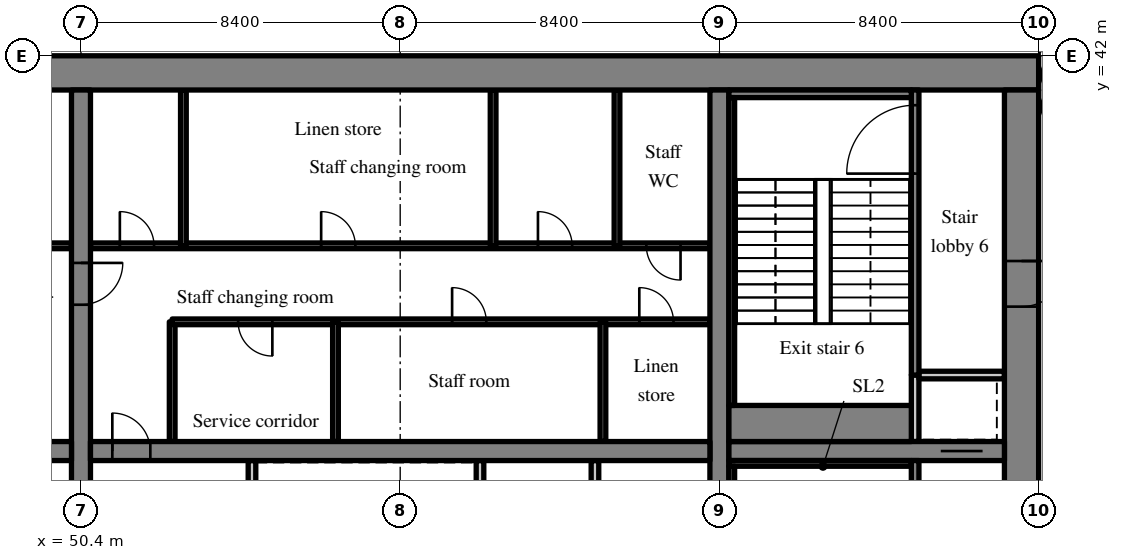
"""IFC4 building model, lengths in metres.
Left out: names, types, materials, properties, quantities, classifications, styles, units other than length and angle.
Written with IfcOpenShell. Run it as: python <this file> out.ifc"""

import sys

from ifc_helpers import new_model, si_unit, direction, frame, frame_2d, origin, place, context, subcontext, project, spatial, rectangle, extrude, source, transform, mapped, element, fill, save


model = new_model("IFC4")
c1 = context("Model", 3, precision=1e-05, world=origin(), true_north=direction((0.0, 1.0)))
c2 = subcontext(c1, "Body", "Model", "MODEL_VIEW")
j1 = project(units=[si_unit("LENGTHUNIT", "METRE"), si_unit("PLANEANGLEUNIT", "RADIAN")], contexts=[c1])
p1 = place(None, origin())
s1 = spatial("IfcSite", under=j1, at=p1, CompositionType="ELEMENT")
p2 = place(p1, origin())
s2 = spatial("IfcBuilding", under=s1, at=p2, CompositionType="ELEMENT")
p3 = place(p2, frame((0.0, 0.0, 86.4)))
s3 = spatial("IfcBuildingStorey", under=s2, at=p3, CompositionType="ELEMENT", Elevation=86.4)
m1 = source(origin(), c2, "Body", "SweptSolid", [
    extrude(rectangle(XDim=50.4, YDim=0.9, at=frame_2d((25.2, 0.0))), origin(), (0.0, 0.0, 1.0), 4.72),
])
p4 = place(p3, frame((25.2, 41.55, 0.0), z_axis=(0.0, 0.0, 1.0), x_axis=(1.0, 0.0, 0.0)))
e1 = element("IfcWall", 1, at=p4, inside=s3, PredefinedType="SHEAR", context=c2, shape_type="MappedRepresentation", body=[
    mapped(m1, transform((0.0, 0.0, 0.0), scale=1.0)),
])
m2 = source(origin(), c2, "Body", "SweptSolid", [
    extrude(rectangle(XDim=18.2, YDim=0.9, at=frame_2d((9.1, 0.0))), origin(), (0.0, 0.0, 1.0), 4.72),
])
p5 = place(p3, frame((75.15, 22.9, 0.0), z_axis=(0.0, 0.0, 1.0), x_axis=(0.0, 1.0, 0.0)))
e2 = element("IfcWall", 2, at=p5, inside=s3, PredefinedType="SHEAR", context=c2, shape_type="MappedRepresentation", body=[
    mapped(m2, transform((0.0, 0.0, 0.0), scale=1.0)),
])
m3 = source(origin(), c2, "Body", "SweptSolid", [
    extrude(rectangle(XDim=1.2, YDim=2.1, at=frame_2d((0.6, 1.05))), frame((0.0, 0.46, 0.0), z_axis=(0.0, -1.0, 0.0), x_axis=(1.0, 0.0, 0.0)), (0.0, 0.0, 1.0), 0.92),
])
p6 = place(p5, frame((12.5, 0.0, 0.0)))
e3 = element("IfcOpeningElement", 3, at=p6, cuts=e2, PredefinedType="OPENING", context=c2, shape_type="MappedRepresentation", body=[
    mapped(m3, transform((0.0, 0.0, 0.0), scale=1.0)),
])
m4 = source(origin(), c2, "Body", "SweptSolid", [
    extrude(rectangle(XDim=18.2, YDim=0.5, at=frame_2d((9.1, 0.0))), origin(), (0.0, 0.0, 1.0), 4.72),
])
p7 = place(p3, frame((50.4, 22.9, 0.0), z_axis=(0.0, 0.0, 1.0), x_axis=(0.0, 1.0, 0.0)))
e4 = element("IfcWall", 4, at=p7, inside=s3, PredefinedType="SHEAR", context=c2, shape_type="MappedRepresentation", body=[
    mapped(m4, transform((0.0, 0.0, 0.0), scale=1.0)),
])
m5 = source(origin(), c2, "Body", "SweptSolid", [
    extrude(rectangle(XDim=1.1, YDim=2.1, at=frame_2d((0.55, 1.05))), frame((0.0, 0.26, 0.0), z_axis=(0.0, -1.0, 0.0), x_axis=(1.0, 0.0, 0.0)), (0.0, 0.0, 1.0), 0.52),
])
p8 = place(p7, frame((12.55, 0.0, 0.0)))
e5 = element("IfcOpeningElement", 5, at=p8, cuts=e4, PredefinedType="OPENING", context=c2, shape_type="MappedRepresentation", body=[
    mapped(m5, transform((0.0, 0.0, 0.0), scale=1.0)),
])
p9 = place(p3, frame((67.2, 22.9, 0.0), z_axis=(0.0, 0.0, 1.0), x_axis=(0.0, 1.0, 0.0)))
e6 = element("IfcWall", 6, at=p9, inside=s3, PredefinedType="SHEAR", context=c2, shape_type="MappedRepresentation", body=[
    mapped(m4, transform((0.0, 0.0, 0.0), scale=1.0)),
])
m6 = source(origin(), c2, "Body", "SweptSolid", [
    extrude(rectangle(XDim=16.3, YDim=0.5, at=frame_2d((8.15, 0.0))), origin(), (0.0, 0.0, 1.0), 4.72),
])
p10 = place(p3, frame((33.85, 31.6, 0.0), z_axis=(0.0, 0.0, 1.0), x_axis=(1.0, 0.0, 0.0)))
e7 = element("IfcWall", 7, at=p10, inside=s3, PredefinedType="SHEAR", context=c2, shape_type="MappedRepresentation", body=[
    mapped(m6, transform((0.0, 0.0, 0.0), scale=1.0)),
])
m7 = source(origin(), c2, "Body", "SweptSolid", [
    extrude(rectangle(XDim=1.0, YDim=2.1, at=frame_2d((0.5, 1.05))), frame((0.0, 0.26, 0.0), z_axis=(0.0, -1.0, 0.0), x_axis=(1.0, 0.0, 0.0)), (0.0, 0.0, 1.0), 0.52),
])
p11 = place(p10, frame((14.725, 0.0, 0.0)))
e8 = element("IfcOpeningElement", 8, at=p11, cuts=e7, PredefinedType="OPENING", context=c2, shape_type="MappedRepresentation", body=[
    mapped(m7, transform((0.0, 0.0, 0.0), scale=1.0)),
])
m8 = source(origin(), c2, "Body", "SweptSolid", [
    extrude(rectangle(XDim=16.3, YDim=0.5, at=frame_2d((8.15, 0.0))), origin(), (0.0, 0.0, 1.0), 4.72),
])
p12 = place(p3, frame((50.65, 31.6, 0.0), z_axis=(0.0, 0.0, 1.0), x_axis=(1.0, 0.0, 0.0)))
e9 = element("IfcWall", 9, at=p12, inside=s3, PredefinedType="SHEAR", context=c2, shape_type="MappedRepresentation", body=[
    mapped(m8, transform((0.0, 0.0, 0.0), scale=1.0)),
])
p13 = place(p12, frame((0.575, 0.0, 0.0)))
e10 = element("IfcOpeningElement", 10, at=p13, cuts=e9, PredefinedType="OPENING", context=c2, shape_type="MappedRepresentation", body=[
    mapped(m7, transform((0.0, 0.0, 0.0), scale=1.0)),
])
m9 = source(origin(), c2, "Body", "SweptSolid", [
    extrude(rectangle(XDim=7.25, YDim=0.5, at=frame_2d((3.625, 0.0))), origin(), (0.0, 0.0, 1.0), 4.72),
])
p14 = place(p3, frame((67.45, 31.6, 0.0), z_axis=(0.0, 0.0, 1.0), x_axis=(1.0, 0.0, 0.0)))
e11 = element("IfcWall", 11, at=p14, inside=s3, PredefinedType="SHEAR", context=c2, shape_type="MappedRepresentation", body=[
    mapped(m9, transform((0.0, 0.0, 0.0), scale=1.0)),
])
p15 = place(p14, frame((5.575, 0.0, 0.0)))
e12 = element("IfcOpeningElement", 12, at=p15, cuts=e11, PredefinedType="OPENING", context=c2, shape_type="MappedRepresentation", body=[
    mapped(m5, transform((0.0, 0.0, 0.0), scale=1.0)),
])
m10 = source(origin(), c2, "Body", "SweptSolid", [
    extrude(rectangle(XDim=3.559, YDim=0.3, at=frame_2d((1.78, 0.0))), origin(), (0.0, 0.0, 1.0), 4.72),
])
p16 = place(p3, frame((76.523, 43.292, 0.0), z_axis=(0.0, 0.0, 1.0), x_axis=(-0.35779745313, -0.933799219604, 0.0)))
e13 = element("IfcWall", 13, at=p16, inside=s3, PredefinedType="SOLIDWALL", context=c2, shape_type="MappedRepresentation", body=[
    mapped(m10, transform((0.0, 0.0, 0.0), scale=1.0)),
])
m11 = source(origin(), c2, "Body", "SweptSolid", [
    extrude(rectangle(XDim=1.5, YDim=2.0, at=frame_2d((0.75, 1.0))), frame((0.0, 0.16, 0.0), z_axis=(0.0, -1.0, 0.0), x_axis=(1.0, 0.0, 0.0)), (0.0, 0.0, 1.0), 0.32),
])
p17 = place(p16, frame((0.156, 0.0, 0.9)))
e14 = element("IfcOpeningElement", 14, at=p17, cuts=e13, PredefinedType="OPENING", context=c2, shape_type="MappedRepresentation", body=[
    mapped(m11, transform((0.0, 0.0, 0.0), scale=1.0)),
])
m12 = source(origin(), c2, "Body", "SweptSolid", [
    extrude(rectangle(XDim=16.3, YDim=0.15, at=frame_2d((8.15, 0.0))), origin(), (0.0, 0.0, 1.0), 4.72),
])
p18 = place(p3, frame((33.85, 37.0, 0.0), z_axis=(0.0, 0.0, 1.0), x_axis=(1.0, 0.0, 0.0)))
e15 = element("IfcWall", 15, at=p18, inside=s3, PredefinedType="PARTITIONING", context=c2, shape_type="MappedRepresentation", body=[
    mapped(m12, transform((0.0, 0.0, 0.0), scale=1.0)),
])
m13 = source(origin(), c2, "Body", "SweptSolid", [
    extrude(rectangle(XDim=0.9, YDim=2.1, at=frame_2d((0.45, 1.05))), frame((0.0, 0.085, 0.0), z_axis=(0.0, -1.0, 0.0), x_axis=(1.0, 0.0, 0.0)), (0.0, 0.0, 1.0), 0.17),
])
p19 = place(p18, frame((3.217, 0.0, 0.0)))
e16 = element("IfcOpeningElement", 16, at=p19, cuts=e15, PredefinedType="OPENING", context=c2, shape_type="MappedRepresentation", body=[
    mapped(m13, transform((0.0, 0.0, 0.0), scale=1.0)),
])
p20 = place(p18, frame((8.107, 0.0, 0.0)))
e17 = element("IfcOpeningElement", 17, at=p20, cuts=e15, PredefinedType="OPENING", context=c2, shape_type="MappedRepresentation", body=[
    mapped(m13, transform((0.0, 0.0, 0.0), scale=1.0)),
])
p21 = place(p18, frame((11.368, 0.0, 0.0)))
e18 = element("IfcOpeningElement", 18, at=p21, cuts=e15, PredefinedType="OPENING", context=c2, shape_type="MappedRepresentation", body=[
    mapped(m13, transform((0.0, 0.0, 0.0), scale=1.0)),
])
p22 = place(p18, frame((14.627, 0.0, 0.0)))
e19 = element("IfcOpeningElement", 19, at=p22, cuts=e15, PredefinedType="OPENING", context=c2, shape_type="MappedRepresentation", body=[
    mapped(m13, transform((0.0, 0.0, 0.0), scale=1.0)),
])
m14 = source(origin(), c2, "Body", "SweptSolid", [
    extrude(rectangle(XDim=8.45, YDim=0.2, at=frame_2d((4.225, 0.0))), origin(), (0.0, 0.0, 1.0), 4.72),
])
for number, where, z_axis, x_axis in (
    (20, (54.9, 22.9, 0.0), (0.0, 0.0, 1.0), (0.0, 1.0, 0.0)),
    (21, (60.9, 22.9, 0.0), (0.0, 0.0, 1.0), (0.0, 1.0, 0.0)),
    (22, (63.925, 22.9, 0.0), (0.0, 0.0, 1.0), (0.0, 1.0, 0.0)),
):
    element("IfcWall", number, at=place(p3, frame(where, z_axis=z_axis, x_axis=x_axis)), inside=s3, PredefinedType="PARTITIONING", context=c2, shape_type="MappedRepresentation", body=[
        mapped(m14, transform((0.0, 0.0, 0.0), scale=1.0)),
    ])
m15 = source(origin(), c2, "Body", "SweptSolid", [
    extrude(rectangle(XDim=3.15, YDim=0.15, at=frame_2d((1.575, 0.0))), origin(), (0.0, 0.0, 1.0), 4.72),
])
p23 = place(p3, frame((52.8, 31.85, 0.0), z_axis=(0.0, 0.0, 1.0), x_axis=(0.0, 1.0, 0.0)))
e23 = element("IfcWall", 23, at=p23, inside=s3, PredefinedType="PARTITIONING", context=c2, shape_type="MappedRepresentation", body=[
    mapped(m15, transform((0.0, 0.0, 0.0), scale=1.0)),
])
m16 = source(origin(), c2, "Body", "SweptSolid", [
    extrude(rectangle(XDim=14.15, YDim=0.15, at=frame_2d((7.075, 0.0))), origin(), (0.0, 0.0, 1.0), 4.72),
])
p24 = place(p3, frame((66.95, 35.0, 0.0), z_axis=(0.0, 0.0, 1.0), x_axis=(-1.0, 0.0, 0.0)))
e24 = element("IfcWall", 24, at=p24, inside=s3, PredefinedType="PARTITIONING", context=c2, shape_type="MappedRepresentation", body=[
    mapped(m16, transform((0.0, 0.0, 0.0), scale=1.0)),
])
p25 = place(p24, frame((0.958, 0.0, 0.0)))
e25 = element("IfcOpeningElement", 25, at=p25, cuts=e24, PredefinedType="OPENING", context=c2, shape_type="MappedRepresentation", body=[
    mapped(m13, transform((0.0, 0.0, 0.0), scale=1.0)),
])
p26 = place(p24, frame((5.884, 0.0, 0.0)))
e26 = element("IfcOpeningElement", 26, at=p26, cuts=e24, PredefinedType="OPENING", context=c2, shape_type="MappedRepresentation", body=[
    mapped(m13, transform((0.0, 0.0, 0.0), scale=1.0)),
])
p27 = place(p24, frame((11.514, 0.0, 0.0)))
e27 = element("IfcOpeningElement", 27, at=p27, cuts=e24, PredefinedType="OPENING", context=c2, shape_type="MappedRepresentation", body=[
    mapped(m13, transform((0.0, 0.0, 0.0), scale=1.0)),
])
m17 = source(origin(), c2, "Body", "SweptSolid", [
    extrude(rectangle(XDim=16.3, YDim=0.15, at=frame_2d((8.15, 0.0))), origin(), (0.0, 0.0, 1.0), 4.72),
])
p28 = place(p3, frame((66.95, 37.0, 0.0), z_axis=(0.0, 0.0, 1.0), x_axis=(-1.0, 0.0, 0.0)))
e28 = element("IfcWall", 28, at=p28, inside=s3, PredefinedType="PARTITIONING", context=c2, shape_type="MappedRepresentation", body=[
    mapped(m17, transform((0.0, 0.0, 0.0), scale=1.0)),
])
p29 = place(p28, frame((0.773, 0.0, 0.0)))
e29 = element("IfcOpeningElement", 29, at=p29, cuts=e28, PredefinedType="OPENING", context=c2, shape_type="MappedRepresentation", body=[
    mapped(m13, transform((0.0, 0.0, 0.0), scale=1.0)),
])
p30 = place(p28, frame((3.625, 0.0, 0.0)))
e30 = element("IfcOpeningElement", 30, at=p30, cuts=e28, PredefinedType="OPENING", context=c2, shape_type="MappedRepresentation", body=[
    mapped(m13, transform((0.0, 0.0, 0.0), scale=1.0)),
])
p31 = place(p28, frame((9.33, 0.0, 0.0)))
e31 = element("IfcOpeningElement", 31, at=p31, cuts=e28, PredefinedType="OPENING", context=c2, shape_type="MappedRepresentation", body=[
    mapped(m13, transform((0.0, 0.0, 0.0), scale=1.0)),
])
p32 = place(p28, frame((14.627, 0.0, 0.0)))
e32 = element("IfcOpeningElement", 32, at=p32, cuts=e28, PredefinedType="OPENING", context=c2, shape_type="MappedRepresentation", body=[
    mapped(m13, transform((0.0, 0.0, 0.0), scale=1.0)),
])
for number, where, z_axis, x_axis in (
    (33, (64.135, 31.85, 0.0), (0.0, 0.0, 1.0), (0.0, 1.0, 0.0)),
    (34, (57.097, 31.85, 0.0), (0.0, 0.0, 1.0), (0.0, 1.0, 0.0)),
):
    element("IfcWall", number, at=place(p3, frame(where, z_axis=z_axis, x_axis=x_axis)), inside=s3, PredefinedType="PARTITIONING", context=c2, shape_type="MappedRepresentation", body=[
        mapped(m15, transform((0.0, 0.0, 0.0), scale=1.0)),
    ])
m18 = source(origin(), c2, "Body", "SweptSolid", [
    extrude(rectangle(XDim=4.1, YDim=0.15, at=frame_2d((2.05, 0.0))), origin(), (0.0, 0.0, 1.0), 4.72),
])
for number, where, z_axis, x_axis in (
    (35, (64.505, 37.0, 0.0), (0.0, 0.0, 1.0), (0.0, 1.0, 0.0)),
    (36, (61.245, 37.0, 0.0), (0.0, 0.0, 1.0), (0.0, 1.0, 0.0)),
    (37, (53.095, 37.0, 0.0), (0.0, 0.0, 1.0), (0.0, 1.0, 0.0)),
):
    element("IfcWall", number, at=place(p3, frame(where, z_axis=z_axis, x_axis=x_axis)), inside=s3, PredefinedType="PARTITIONING", context=c2, shape_type="MappedRepresentation", body=[
        mapped(m18, transform((0.0, 0.0, 0.0), scale=1.0)),
    ])
m19 = source(origin(), c2, "Body", "SweptSolid", [
    extrude(rectangle(XDim=8.45, YDim=0.2, at=frame_2d((4.225, 0.0))), origin(), (0.0, 0.0, 1.0), 4.72),
])
p33 = place(p3, frame((72.35, 22.9, 0.0), z_axis=(0.0, 0.0, 1.0), x_axis=(0.0, 1.0, 0.0)))
e38 = element("IfcWall", 38, at=p33, inside=s3, PredefinedType="SOLIDWALL", context=c2, shape_type="MappedRepresentation", body=[
    mapped(m19, transform((0.0, 0.0, 0.0), scale=1.0)),
])
m20 = source(origin(), c2, "Body", "SweptSolid", [
    extrude(rectangle(XDim=1.2, YDim=2.1, at=frame_2d((0.6, 1.05))), frame((0.0, 0.11, 0.0), z_axis=(0.0, -1.0, 0.0), x_axis=(1.0, 0.0, 0.0)), (0.0, 0.0, 1.0), 0.22),
])
p34 = place(p33, frame((6.6, 0.0, 0.0)))
e39 = element("IfcOpeningElement", 39, at=p34, cuts=e38, PredefinedType="OPENING", context=c2, shape_type="MappedRepresentation", body=[
    mapped(m20, transform((0.0, 0.0, 0.0), scale=1.0)),
])
m21 = source(origin(), c2, "Body", "SweptSolid", [
    extrude(rectangle(XDim=1.75, YDim=0.2, at=frame_2d((0.875, 0.0))), origin(), (0.0, 0.0, 1.0), 4.72),
])
p35 = place(p3, frame((72.35, 31.85, 0.0), z_axis=(0.0, 0.0, 1.0), x_axis=(0.0, 1.0, 0.0)))
e40 = element("IfcWall", 40, at=p35, inside=s3, PredefinedType="SOLIDWALL", context=c2, shape_type="MappedRepresentation", body=[
    mapped(m21, transform((0.0, 0.0, 0.0), scale=1.0)),
])
m22 = source(origin(), c2, "Body", "SweptSolid", [
    extrude(rectangle(XDim=2.25, YDim=0.2, at=frame_2d((1.125, 0.0))), origin(), (0.0, 0.0, 1.0), 4.72),
])
p36 = place(p3, frame((72.45, 33.6, 0.0), z_axis=(0.0, 0.0, 1.0), x_axis=(1.0, 0.0, 0.0)))
e41 = element("IfcWall", 41, at=p36, inside=s3, PredefinedType="SOLIDWALL", context=c2, shape_type="MappedRepresentation", body=[
    mapped(m22, transform((0.0, 0.0, 0.0), scale=1.0)),
])
m23 = source(origin(), c2, "Body", "SweptSolid", [
    extrude(rectangle(XDim=7.5, YDim=0.2, at=frame_2d((3.75, 0.0))), origin(), (0.0, 0.0, 1.0), 4.72),
])
p37 = place(p3, frame((72.35, 33.6, 0.0), z_axis=(0.0, 0.0, 1.0), x_axis=(0.0, 1.0, 0.0)))
e42 = element("IfcWall", 42, at=p37, inside=s3, PredefinedType="SOLIDWALL", context=c2, shape_type="MappedRepresentation", body=[
    mapped(m23, transform((0.0, 0.0, 0.0), scale=1.0)),
])
m24 = source(origin(), c2, "Body", "SweptSolid", [
    extrude(rectangle(XDim=1.8, YDim=2.1, at=frame_2d((0.9, 1.05))), frame((0.0, 0.11, 0.0), z_axis=(0.0, -1.0, 0.0), x_axis=(1.0, 0.0, 0.0)), (0.0, 0.0, 1.0), 0.22),
])
p38 = place(p37, frame((5.3, 0.0, 0.0)))
e43 = element("IfcOpeningElement", 43, at=p38, cuts=e42, PredefinedType="OPENING", context=c2, shape_type="MappedRepresentation", body=[
    mapped(m24, transform((0.0, 0.0, 0.0), scale=1.0)),
])
m25 = source(origin(), c2, "Body", "SweptSolid", [
    extrude(rectangle(XDim=4.8, YDim=0.15, at=frame_2d((2.4, 0.0))), origin(), (0.0, 0.0, 1.0), 4.72),
])
p39 = place(p3, frame((67.45, 31.275, 0.0), z_axis=(0.0, 0.0, 1.0), x_axis=(1.0, 0.0, 0.0)))
e44 = element("IfcWall", 44, at=p39, inside=s3, PredefinedType="SOLIDWALL", context=c2, shape_type="MappedRepresentation", body=[
    mapped(m25, transform((0.0, 0.0, 0.0), scale=1.0)),
])
m26 = source(origin(), c2, "Body", "SweptSolid", [
    extrude(rectangle(XDim=8.1, YDim=0.15, at=frame_2d((4.05, 0.0))), origin(), (0.0, 0.0, 1.0), 4.72),
])
p40 = place(p3, frame((67.525, 23.1, 0.0), z_axis=(0.0, 0.0, 1.0), x_axis=(0.0, 1.0, 0.0)))
e45 = element("IfcWall", 45, at=p40, inside=s3, PredefinedType="SOLIDWALL", context=c2, shape_type="MappedRepresentation", body=[
    mapped(m26, transform((0.0, 0.0, 0.0), scale=1.0)),
])
m27 = source(origin(), c2, "Body", "SweptSolid", [
    extrude(rectangle(XDim=4.8, YDim=0.2, at=frame_2d((2.4, 0.0))), origin(), (0.0, 0.0, 1.0), 4.72),
])
p41 = place(p3, frame((67.45, 41.0, 0.0), z_axis=(0.0, 0.0, 1.0), x_axis=(1.0, 0.0, 0.0)))
e46 = element("IfcWall", 46, at=p41, inside=s3, PredefinedType="SOLIDWALL", context=c2, shape_type="MappedRepresentation", body=[
    mapped(m27, transform((0.0, 0.0, 0.0), scale=1.0)),
])
m28 = source(origin(), c2, "Body", "SweptSolid", [
    extrude(rectangle(XDim=4.8, YDim=0.95, at=frame_2d((2.4, 0.0))), origin(), (0.0, 0.0, 1.0), 4.72),
])
p42 = place(p3, frame((67.45, 32.325, 0.0), z_axis=(0.0, 0.0, 1.0), x_axis=(1.0, 0.0, 0.0)))
e47 = element("IfcWall", 47, at=p42, inside=s3, PredefinedType="SOLIDWALL", context=c2, shape_type="MappedRepresentation", body=[
    mapped(m28, transform((0.0, 0.0, 0.0), scale=1.0)),
])
p43 = place(p3, frame((67.525, 32.8, 0.0), z_axis=(0.0, 0.0, 1.0), x_axis=(0.0, 1.0, 0.0)))
e48 = element("IfcWall", 48, at=p43, inside=s3, PredefinedType="SOLIDWALL", context=c2, shape_type="MappedRepresentation", body=[
    mapped(m26, transform((0.0, 0.0, 0.0), scale=1.0)),
])
m29 = source(origin(), c2, "Body", "SweptSolid", [
    extrude(rectangle(XDim=1.0, YDim=2.1, at=frame_2d((0.5, 1.05))), frame((0.0, 0.025, 0.0), z_axis=(0.0, -1.0, 0.0), x_axis=(1.0, 0.0, 0.0)), (0.0, 0.0, 1.0), 0.05),
])
p44 = place(p13, origin())
e49 = element("IfcDoor", 49, at=p44, inside=s3, OperationType="SINGLE_SWING_LEFT", PredefinedType="DOOR", context=c2, shape_type="MappedRepresentation", body=[
    mapped(m29, transform((0.0, 0.0, 0.0), scale=1.0)),
])
fill(e10, e49)
m30 = source(origin(), c2, "Body", "SweptSolid", [
    extrude(rectangle(XDim=0.9, YDim=2.1, at=frame_2d((0.45, 1.05))), frame((0.0, 0.025, 0.0), z_axis=(0.0, -1.0, 0.0), x_axis=(1.0, 0.0, 0.0)), (0.0, 0.0, 1.0), 0.05),
])
p45 = place(p25, origin())
e50 = element("IfcDoor", 50, at=p45, inside=s3, OperationType="SINGLE_SWING_RIGHT", PredefinedType="DOOR", context=c2, shape_type="MappedRepresentation", body=[
    mapped(m30, transform((0.0, 0.0, 0.0), scale=1.0)),
])
fill(e25, e50)
p46 = place(p26, origin())
e51 = element("IfcDoor", 51, at=p46, inside=s3, OperationType="SINGLE_SWING_RIGHT", PredefinedType="DOOR", context=c2, shape_type="MappedRepresentation", body=[
    mapped(m30, transform((0.0, 0.0, 0.0), scale=1.0)),
])
fill(e26, e51)
p47 = place(p27, origin())
e52 = element("IfcDoor", 52, at=p47, inside=s3, OperationType="SINGLE_SWING_LEFT", PredefinedType="DOOR", context=c2, shape_type="MappedRepresentation", body=[
    mapped(m30, transform((0.0, 0.0, 0.0), scale=1.0)),
])
fill(e27, e52)
p48 = place(p29, origin())
e53 = element("IfcDoor", 53, at=p48, inside=s3, OperationType="SINGLE_SWING_LEFT", PredefinedType="DOOR", context=c2, shape_type="MappedRepresentation", body=[
    mapped(m30, transform((0.0, 0.0, 0.0), scale=1.0)),
])
fill(e29, e53)
p49 = place(p30, origin())
e54 = element("IfcDoor", 54, at=p49, inside=s3, OperationType="SINGLE_SWING_RIGHT", PredefinedType="DOOR", context=c2, shape_type="MappedRepresentation", body=[
    mapped(m30, transform((0.0, 0.0, 0.0), scale=1.0)),
])
fill(e30, e54)
p50 = place(p31, origin())
e55 = element("IfcDoor", 55, at=p50, inside=s3, OperationType="SINGLE_SWING_RIGHT", PredefinedType="DOOR", context=c2, shape_type="MappedRepresentation", body=[
    mapped(m30, transform((0.0, 0.0, 0.0), scale=1.0)),
])
fill(e31, e55)
p51 = place(p32, origin())
e56 = element("IfcDoor", 56, at=p51, inside=s3, OperationType="SINGLE_SWING_RIGHT", PredefinedType="DOOR", context=c2, shape_type="MappedRepresentation", body=[
    mapped(m30, transform((0.0, 0.0, 0.0), scale=1.0)),
])
fill(e32, e56)
m31 = source(origin(), c2, "Body", "SweptSolid", [
    extrude(rectangle(XDim=1.1, YDim=2.1, at=frame_2d((0.55, 1.05))), frame((0.0, 0.025, 0.0), z_axis=(0.0, -1.0, 0.0), x_axis=(1.0, 0.0, 0.0)), (0.0, 0.0, 1.0), 0.05),
])
p52 = place(p15, origin())
e57 = element("IfcDoor", 57, at=p52, inside=s3, OperationType="SLIDING_TO_RIGHT", PredefinedType="DOOR", context=c2, shape_type="MappedRepresentation", body=[
    mapped(m31, transform((0.0, 0.0, 0.0), scale=1.0)),
])
fill(e12, e57)
m32 = source(origin(), c2, "Body", "SweptSolid", [
    extrude(rectangle(XDim=1.8, YDim=2.1, at=frame_2d((0.9, 1.05))), frame((0.0, 0.025, 0.0), z_axis=(0.0, -1.0, 0.0), x_axis=(1.0, 0.0, 0.0)), (0.0, 0.0, 1.0), 0.05),
])
p53 = place(p38, origin())
e58 = element("IfcDoor", 58, at=p53, inside=s3, OperationType="SINGLE_SWING_LEFT", PredefinedType="DOOR", context=c2, shape_type="MappedRepresentation", body=[
    mapped(m32, transform((0.0, 0.0, 0.0), scale=1.0)),
])
fill(e43, e58)
m33 = source(origin(), c2, "Body", "SweptSolid", [
    extrude(rectangle(XDim=1.2, YDim=2.1, at=frame_2d((0.6, 1.05))), frame((0.0, 0.025, 0.0), z_axis=(0.0, -1.0, 0.0), x_axis=(1.0, 0.0, 0.0)), (0.0, 0.0, 1.0), 0.05),
])
p54 = place(p6, origin())
e59 = element("IfcDoor", 59, at=p54, inside=s3, OperationType="SINGLE_SWING_RIGHT", PredefinedType="DOOR", context=c2, shape_type="MappedRepresentation", body=[
    mapped(m33, transform((0.0, 0.0, 0.0), scale=1.0)),
])
fill(e3, e59)
p55 = place(p8, origin())
e60 = element("IfcDoor", 60, at=p55, inside=s3, OperationType="SINGLE_SWING_RIGHT", PredefinedType="DOOR", context=c2, shape_type="MappedRepresentation", body=[
    mapped(m31, transform((0.0, 0.0, 0.0), scale=1.0)),
])
fill(e5, e60)
save(model, sys.argv[1])
